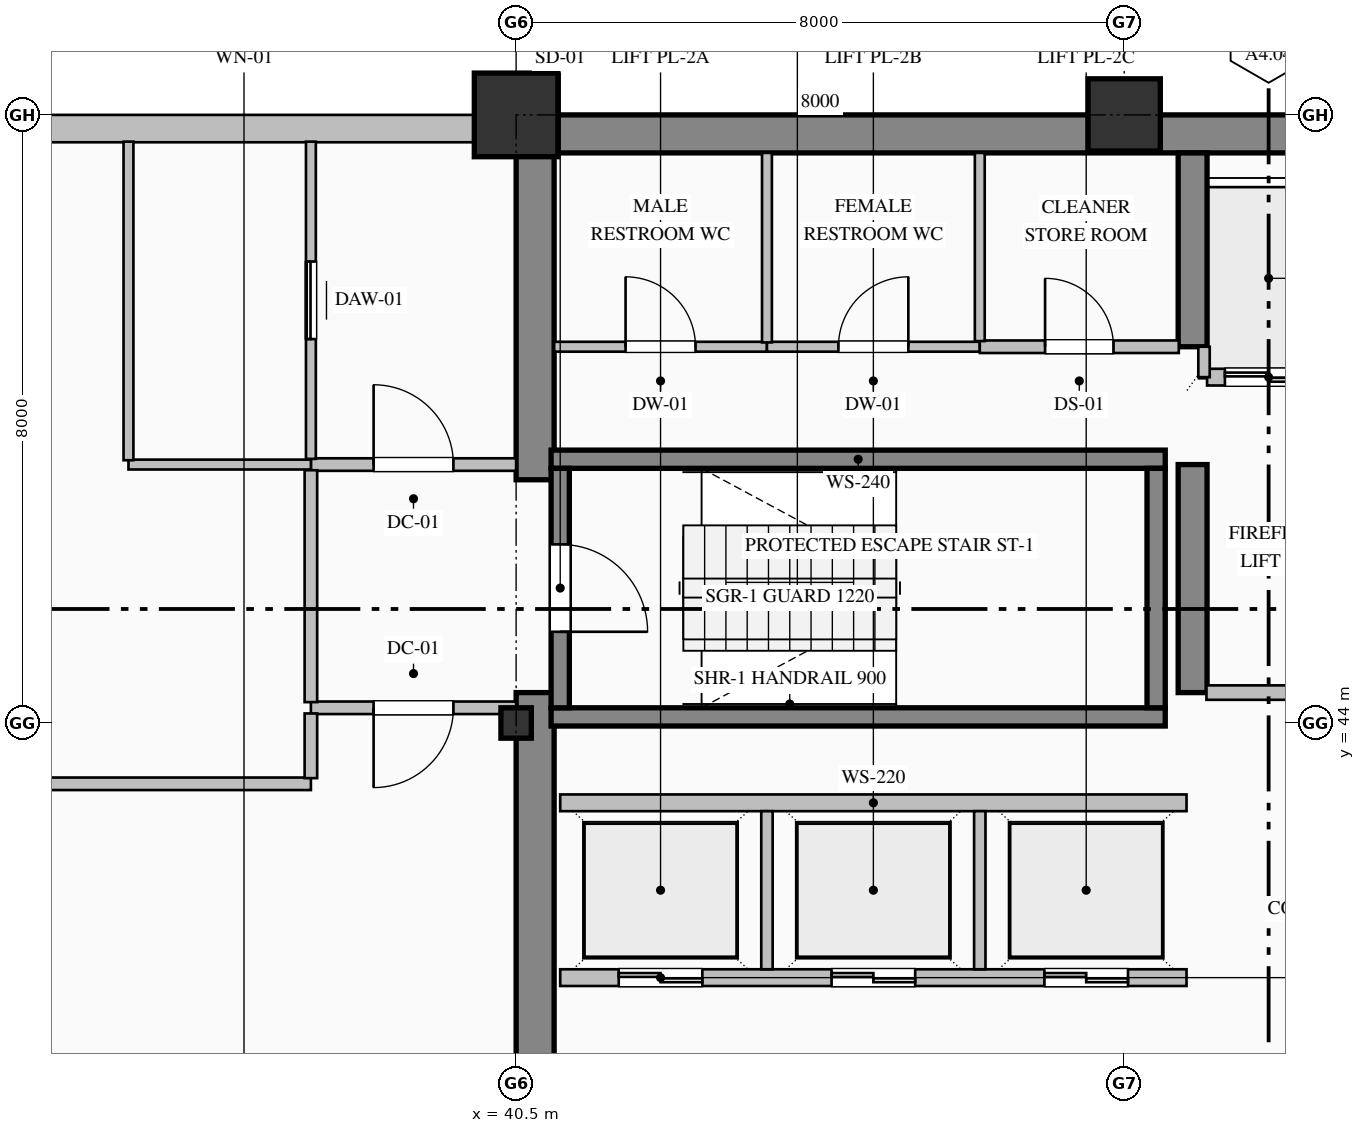
"""IFC4 building model, lengths in metres.
Left out: names, types, materials, properties, quantities, classifications, styles, units other than length and angle.
Written with IfcOpenShell. Run it as: python <this file> out.ifc"""

import sys

from ifc_helpers import new_model, si_unit, direction, frame, frame_2d, origin, origin_2d, place, context, subcontext, project, spatial, rectangle, hollow_rectangle, i_section, extrude, element, fill, save


model = new_model("IFC4")
c1 = context("Model", 3, precision=1e-05, world=origin(), true_north=direction((0.0, 1.0)))
c2 = subcontext(c1, "Body", "Model", "MODEL_VIEW")
j1 = project(units=[si_unit("LENGTHUNIT", "METRE"), si_unit("PLANEANGLEUNIT", "RADIAN")], contexts=[c1])
p1 = place(None, origin())
s1 = spatial("IfcSite", under=j1, at=p1, CompositionType="ELEMENT")
p2 = place(p1, origin())
s2 = spatial("IfcBuilding", under=s1, at=p2, CompositionType="ELEMENT")
p3 = place(p2, frame((0.0, 0.0, 155.0)))
s3 = spatial("IfcBuildingStorey", under=s2, at=p3, CompositionType="ELEMENT", Elevation=155.0)
p4 = place(p3, frame((40.5, 51.75, 0.0), z_axis=(0.0, 0.0, 1.0), x_axis=(1.0, 0.0, 0.0)))
e1 = element("IfcWall", 1, at=p4, inside=s3, PredefinedType="SHEAR", context=c2, shape_type="SweptSolid", body=[
    extrude(rectangle(XDim=23.5, YDim=0.5, at=frame_2d((11.75, 0.0))), origin(), (0.0, 0.0, 1.0), 3.765),
])
p5 = place(p3, frame((40.75, 36.5, 0.0), z_axis=(0.0, 0.0, 1.0), x_axis=(0.0, 1.0, 0.0)))
e2 = element("IfcWall", 2, at=p5, inside=s3, PredefinedType="SHEAR", context=c2, shape_type="SweptSolid", body=[
    extrude(rectangle(XDim=7.9, YDim=0.5, at=frame_2d((3.95, 0.0))), origin(), (0.0, 0.0, 1.0), 3.765),
])
p6 = place(p3, frame((40.75, 47.2, 0.0), z_axis=(0.0, 0.0, 1.0), x_axis=(0.0, 1.0, 0.0)))
e3 = element("IfcWall", 3, at=p6, inside=s3, PredefinedType="SHEAR", context=c2, shape_type="SweptSolid", body=[
    extrude(rectangle(XDim=4.3, YDim=0.5, at=frame_2d((2.15, 0.0))), origin(), (0.0, 0.0, 1.0), 3.765),
])
p7 = place(p3, frame((49.4, 44.4, 0.0), z_axis=(0.0, 0.0, 1.0), x_axis=(0.0, 1.0, 0.0)))
e4 = element("IfcWall", 4, at=p7, inside=s3, PredefinedType="SHEAR", context=c2, shape_type="SweptSolid", body=[
    extrude(rectangle(XDim=3.0, YDim=0.38, at=frame_2d((1.5, 0.0))), origin(), (0.0, 0.0, 1.0), 3.765),
])
p8 = place(p3, frame((49.4, 48.95, 0.0), z_axis=(0.0, 0.0, 1.0), x_axis=(0.0, 1.0, 0.0)))
e5 = element("IfcWall", 5, at=p8, inside=s3, PredefinedType="SHEAR", context=c2, shape_type="SweptSolid", body=[
    extrude(rectangle(XDim=2.55, YDim=0.38, at=frame_2d((1.275, 0.0))), origin(), (0.0, 0.0, 1.0), 3.765),
])
p9 = place(p3, frame((40.5, 44.0, 0.0), z_axis=(0.0, 0.0, 1.0), x_axis=(1.0, 0.0, 0.0)))
e6 = element("IfcColumn", 6, at=p9, inside=s3, PredefinedType="COLUMN", context=c2, shape_type="SweptSolid", body=[
    extrude(i_section(OverallWidth=0.4, OverallDepth=0.4, WebThickness=0.013, FlangeThickness=0.021, FilletRadius=0.022, at=origin_2d()), origin(), (0.0, 0.0, 1.0), 4.0),
])
p10 = place(p3, frame((40.5, 52.0, 0.0), z_axis=(0.0, 0.0, 1.0), x_axis=(1.0, 0.0, 0.0)))
e7 = element("IfcColumn", 7, at=p10, inside=s3, PredefinedType="COLUMN", context=c2, shape_type="SweptSolid", body=[
    extrude(hollow_rectangle(XDim=1.1, YDim=1.1, WallThickness=0.04, at=origin_2d()), origin(), (0.0, 0.0, 1.0), 4.0),
])
p11 = place(p3, frame((48.5, 52.0, 0.0), z_axis=(0.0, 0.0, 1.0), x_axis=(1.0, 0.0, 0.0)))
e8 = element("IfcColumn", 8, at=p11, inside=s3, PredefinedType="COLUMN", context=c2, shape_type="SweptSolid", body=[
    extrude(hollow_rectangle(XDim=0.95, YDim=0.95, WallThickness=0.036, at=origin_2d()), origin(), (0.0, 0.0, 1.0), 4.0),
])
p12 = place(p3, frame((13.0, 51.82, 0.0), z_axis=(0.0, 0.0, 1.0), x_axis=(1.0, 0.0, 0.0)))
e9 = element("IfcWall", 9, at=p12, inside=s3, PredefinedType="SOLIDWALL", context=c2, shape_type="SweptSolid", body=[
    extrude(rectangle(XDim=27.52, YDim=0.36, at=frame_2d((13.76, 0.0))), origin(), (0.0, 0.0, 1.0), 3.265),
])
p13 = place(p12, frame((6.375, 0.0, 0.85)))
e10 = element("IfcOpeningElement", 10, at=p13, cuts=e9, PredefinedType="OPENING", context=c2, shape_type="SweptSolid", body=[
    extrude(rectangle(XDim=1.65, YDim=1.95, at=frame_2d((0.825, 0.975))), frame((0.0, 0.19, 0.0), z_axis=(0.0, -1.0, 0.0), x_axis=(1.0, 0.0, 0.0)), (0.0, 0.0, 1.0), 0.38),
])
p14 = place(p12, frame((13.65, 0.0, 0.85)))
e11 = element("IfcOpeningElement", 11, at=p14, cuts=e9, PredefinedType="OPENING", context=c2, shape_type="SweptSolid", body=[
    extrude(rectangle(XDim=1.5, YDim=1.95, at=frame_2d((0.75, 0.975))), frame((0.0, 0.19, 0.0), z_axis=(0.0, -1.0, 0.0), x_axis=(1.0, 0.0, 0.0)), (0.0, 0.0, 1.0), 0.38),
])
for number, where, z_axis, x_axis in (
    (12, (40.96, 47.47, 0.0), (0.0, 0.0, 1.0), (1.0, 0.0, 0.0)),
    (13, (49.04, 44.08, 0.0), (0.0, 0.0, 1.0), (-1.0, 0.0, 0.0)),
):
    element("IfcWall", number, at=place(p3, frame(where, z_axis=z_axis, x_axis=x_axis)), inside=s3, PredefinedType="SOLIDWALL", context=c2, shape_type="SweptSolid", body=[
        extrude(rectangle(XDim=8.08, YDim=0.24, at=frame_2d((4.04, 0.0))), origin(), (0.0, 0.0, 1.0), 4.0),
    ])
p15 = place(p3, frame((41.08, 47.35, 0.0), z_axis=(0.0, 0.0, 1.0), x_axis=(0.0, -1.0, 0.0)))
e14 = element("IfcWall", 14, at=p15, inside=s3, PredefinedType="SOLIDWALL", context=c2, shape_type="SweptSolid", body=[
    extrude(rectangle(XDim=3.15, YDim=0.24, at=frame_2d((1.575, 0.0))), origin(), (0.0, 0.0, 1.0), 4.0),
])
p16 = place(p15, frame((1.0, 0.0, 0.0)))
e15 = element("IfcOpeningElement", 15, at=p16, cuts=e14, PredefinedType="OPENING", context=c2, shape_type="SweptSolid", body=[
    extrude(rectangle(XDim=1.15, YDim=2.2, at=frame_2d((0.575, 1.1))), frame((0.0, 0.13, 0.0), z_axis=(0.0, -1.0, 0.0), x_axis=(1.0, 0.0, 0.0)), (0.0, 0.0, 1.0), 0.26),
])
p17 = place(p3, frame((48.92, 44.2, 0.0), z_axis=(0.0, 0.0, 1.0), x_axis=(0.0, 1.0, 0.0)))
e16 = element("IfcWall", 16, at=p17, inside=s3, PredefinedType="SOLIDWALL", context=c2, shape_type="SweptSolid", body=[
    extrude(rectangle(XDim=3.15, YDim=0.24, at=frame_2d((1.575, 0.0))), origin(), (0.0, 0.0, 1.0), 4.0),
])
p18 = place(p3, frame((54.71, 48.55, 0.0), z_axis=(0.0, 0.0, 1.0), x_axis=(-1.0, 0.0, 0.0)))
e17 = element("IfcWall", 17, at=p18, inside=s3, PredefinedType="PARTITIONING", context=c2, shape_type="SweptSolid", body=[
    extrude(rectangle(XDim=5.12, YDim=0.22, at=frame_2d((2.56, 0.0))), origin(), (0.0, 0.0, 1.0), 3.765),
])
p19 = place(p18, frame((3.735, 0.0, 0.0)))
e18 = element("IfcOpeningElement", 18, at=p19, cuts=e17, PredefinedType="OPENING", context=c2, shape_type="SweptSolid", body=[
    extrude(rectangle(XDim=1.15, YDim=2.2, at=frame_2d((0.575, 1.1))), frame((0.0, 0.12, 0.0), z_axis=(0.0, -1.0, 0.0), x_axis=(1.0, 0.0, 0.0)), (0.0, 0.0, 1.0), 0.24),
])
p20 = place(p18, frame((0.935, 0.0, 0.0)))
e19 = element("IfcOpeningElement", 19, at=p20, cuts=e17, PredefinedType="OPENING", context=c2, shape_type="SweptSolid", body=[
    extrude(rectangle(XDim=1.15, YDim=2.2, at=frame_2d((0.575, 1.1))), frame((0.0, 0.12, 0.0), z_axis=(0.0, -1.0, 0.0), x_axis=(1.0, 0.0, 0.0)), (0.0, 0.0, 1.0), 0.24),
])
p21 = place(p3, frame((49.55, 48.55, 0.0), z_axis=(0.0, 0.0, 1.0), x_axis=(0.0, 1.0, 0.0)))
e20 = element("IfcWall", 20, at=p21, inside=s3, PredefinedType="PARTITIONING", context=c2, shape_type="SweptSolid", body=[
    extrude(rectangle(XDim=0.4, YDim=0.15, at=frame_2d((0.2, 0.0))), origin(), (0.0, 0.0, 1.0), 3.765),
])
p22 = place(p3, frame((49.32, 40.65, 0.0), z_axis=(0.0, 0.0, 1.0), x_axis=(-1.0, 0.0, 0.0)))
e21 = element("IfcWall", 21, at=p22, inside=s3, PredefinedType="PARTITIONING", context=c2, shape_type="SweptSolid", body=[
    extrude(rectangle(XDim=8.24, YDim=0.22, at=frame_2d((4.12, 0.0))), origin(), (0.0, 0.0, 1.0), 3.765),
])
p23 = place(p22, frame((6.37, 0.0, 0.0)))
e22 = element("IfcOpeningElement", 22, at=p23, cuts=e21, PredefinedType="OPENING", context=c2, shape_type="SweptSolid", body=[
    extrude(rectangle(XDim=1.1, YDim=2.2, at=frame_2d((0.55, 1.1))), frame((0.0, 0.12, 0.0), z_axis=(0.0, -1.0, 0.0), x_axis=(1.0, 0.0, 0.0)), (0.0, 0.0, 1.0), 0.24),
])
p24 = place(p22, frame((3.57, 0.0, 0.0)))
e23 = element("IfcOpeningElement", 23, at=p24, cuts=e21, PredefinedType="OPENING", context=c2, shape_type="SweptSolid", body=[
    extrude(rectangle(XDim=1.1, YDim=2.2, at=frame_2d((0.55, 1.1))), frame((0.0, 0.12, 0.0), z_axis=(0.0, -1.0, 0.0), x_axis=(1.0, 0.0, 0.0)), (0.0, 0.0, 1.0), 0.24),
])
p25 = place(p22, frame((0.77, 0.0, 0.0)))
e24 = element("IfcOpeningElement", 24, at=p25, cuts=e21, PredefinedType="OPENING", context=c2, shape_type="SweptSolid", body=[
    extrude(rectangle(XDim=1.1, YDim=2.2, at=frame_2d((0.55, 1.1))), frame((0.0, 0.12, 0.0), z_axis=(0.0, -1.0, 0.0), x_axis=(1.0, 0.0, 0.0)), (0.0, 0.0, 1.0), 0.24),
])
p26 = place(p3, frame((41.08, 42.95, 0.0), z_axis=(0.0, 0.0, 1.0), x_axis=(1.0, 0.0, 0.0)))
e25 = element("IfcWall", 25, at=p26, inside=s3, PredefinedType="PARTITIONING", context=c2, shape_type="SweptSolid", body=[
    extrude(rectangle(XDim=8.24, YDim=0.22, at=frame_2d((4.12, 0.0))), origin(), (0.0, 0.0, 1.0), 3.765),
])
for number, where, z_axis, x_axis in (
    (26, (43.8, 40.76, 0.0), (0.0, 0.0, 1.0), (0.0, 1.0, 0.0)),
    (27, (46.6, 40.76, 0.0), (0.0, 0.0, 1.0), (0.0, 1.0, 0.0)),
):
    element("IfcWall", number, at=place(p3, frame(where, z_axis=z_axis, x_axis=x_axis)), inside=s3, PredefinedType="PARTITIONING", context=c2, shape_type="SweptSolid", body=[
        extrude(rectangle(XDim=2.08, YDim=0.15, at=frame_2d((1.04, 0.0))), origin(), (0.0, 0.0, 1.0), 3.765),
    ])
p27 = place(p3, frame((37.8, 47.4, 0.0), z_axis=(0.0, 0.0, 1.0), x_axis=(1.0, 0.0, 0.0)))
e28 = element("IfcWall", 28, at=p27, inside=s3, PredefinedType="PARTITIONING", context=c2, shape_type="SweptSolid", body=[
    extrude(rectangle(XDim=2.7, YDim=0.165, at=frame_2d((1.35, 0.0))), origin(), (0.0, 0.0, 1.0), 3.765),
])
p28 = place(p27, frame((0.825, 0.0, 0.0)))
e29 = element("IfcOpeningElement", 29, at=p28, cuts=e28, PredefinedType="OPENING", context=c2, shape_type="SweptSolid", body=[
    extrude(rectangle(XDim=1.05, YDim=2.15, at=frame_2d((0.525, 1.075))), frame((0.0, 0.093, 0.0), z_axis=(0.0, -1.0, 0.0), x_axis=(1.0, 0.0, 0.0)), (0.0, 0.0, 1.0), 0.185),
])
p29 = place(p3, frame((40.5, 44.2, 0.0), z_axis=(0.0, 0.0, 1.0), x_axis=(-1.0, 0.0, 0.0)))
e30 = element("IfcWall", 30, at=p29, inside=s3, PredefinedType="PARTITIONING", context=c2, shape_type="SweptSolid", body=[
    extrude(rectangle(XDim=2.7, YDim=0.165, at=frame_2d((1.35, 0.0))), origin(), (0.0, 0.0, 1.0), 3.765),
])
p30 = place(p29, frame((0.825, 0.0, 0.0)))
e31 = element("IfcOpeningElement", 31, at=p30, cuts=e30, PredefinedType="OPENING", context=c2, shape_type="SweptSolid", body=[
    extrude(rectangle(XDim=1.05, YDim=2.15, at=frame_2d((0.525, 1.075))), frame((0.0, 0.093, 0.0), z_axis=(0.0, -1.0, 0.0), x_axis=(1.0, 0.0, 0.0)), (0.0, 0.0, 1.0), 0.185),
])
p31 = place(p3, frame((37.8, 44.274, 0.0), z_axis=(0.0, 0.0, 1.0), x_axis=(0.0, 1.0, 0.0)))
e32 = element("IfcWall", 32, at=p31, inside=s3, PredefinedType="PARTITIONING", context=c2, shape_type="SweptSolid", body=[
    extrude(rectangle(XDim=3.051, YDim=0.165, at=frame_2d((1.525, 0.0))), origin(), (0.0, 0.0, 1.0), 3.765),
])
p32 = place(p3, frame((37.8, 47.475, 0.0), z_axis=(0.0, 0.0, 1.0), x_axis=(0.0, 1.0, 0.0)))
e33 = element("IfcWall", 33, at=p32, inside=s3, PredefinedType="PARTITIONING", context=c2, shape_type="SweptSolid", body=[
    extrude(rectangle(XDim=4.173, YDim=0.13, at=frame_2d((2.087, 0.0))), origin(), (0.0, 0.0, 1.0), 3.765),
])
p33 = place(p32, frame((1.577, 0.0, 0.0)))
e34 = element("IfcOpeningElement", 34, at=p33, cuts=e33, PredefinedType="OPENING", context=c2, shape_type="SweptSolid", body=[
    extrude(rectangle(XDim=1.02, YDim=2.15, at=frame_2d((0.51, 1.075))), frame((0.0, 0.075, 0.0), z_axis=(0.0, -1.0, 0.0), x_axis=(1.0, 0.0, 0.0)), (0.0, 0.0, 1.0), 0.15),
])
p34 = place(p3, frame((37.8, 47.4, 0.0), z_axis=(0.0, 0.0, 1.0), x_axis=(-1.0, 0.0, 0.0)))
e35 = element("IfcWall", 35, at=p34, inside=s3, PredefinedType="PARTITIONING", context=c2, shape_type="SweptSolid", body=[
    extrude(rectangle(XDim=2.4, YDim=0.13, at=frame_2d((1.2, 0.0))), origin(), (0.0, 0.0, 1.0), 3.765),
])
p35 = place(p3, frame((35.4, 47.457, 0.0), z_axis=(0.0, 0.0, 1.0), x_axis=(0.0, 1.0, 0.0)))
e36 = element("IfcWall", 36, at=p35, inside=s3, PredefinedType="PARTITIONING", context=c2, shape_type="SweptSolid", body=[
    extrude(rectangle(XDim=4.191, YDim=0.13, at=frame_2d((2.095, 0.0))), origin(), (0.0, 0.0, 1.0), 3.765),
])
p36 = place(p3, frame((41.0, 48.95, 0.0), z_axis=(0.0, 0.0, 1.0), x_axis=(1.0, 0.0, 0.0)))
e37 = element("IfcWall", 37, at=p36, inside=s3, PredefinedType="PARTITIONING", context=c2, shape_type="SweptSolid", body=[
    extrude(rectangle(XDim=2.8, YDim=0.13, at=frame_2d((1.4, 0.0))), origin(), (0.0, 0.0, 1.0), 3.765),
])
p37 = place(p36, frame((0.94, 0.0, 0.0)))
e38 = element("IfcOpeningElement", 38, at=p37, cuts=e37, PredefinedType="OPENING", context=c2, shape_type="SweptSolid", body=[
    extrude(rectangle(XDim=0.92, YDim=2.15, at=frame_2d((0.46, 1.075))), frame((0.0, 0.075, 0.0), z_axis=(0.0, -1.0, 0.0), x_axis=(1.0, 0.0, 0.0)), (0.0, 0.0, 1.0), 0.15),
])
p38 = place(p3, frame((43.8, 48.95, 0.0), z_axis=(0.0, 0.0, 1.0), x_axis=(1.0, 0.0, 0.0)))
e39 = element("IfcWall", 39, at=p38, inside=s3, PredefinedType="PARTITIONING", context=c2, shape_type="SweptSolid", body=[
    extrude(rectangle(XDim=2.8, YDim=0.13, at=frame_2d((1.4, 0.0))), origin(), (0.0, 0.0, 1.0), 3.765),
])
p39 = place(p38, frame((0.94, 0.0, 0.0)))
e40 = element("IfcOpeningElement", 40, at=p39, cuts=e39, PredefinedType="OPENING", context=c2, shape_type="SweptSolid", body=[
    extrude(rectangle(XDim=0.92, YDim=2.15, at=frame_2d((0.46, 1.075))), frame((0.0, 0.075, 0.0), z_axis=(0.0, -1.0, 0.0), x_axis=(1.0, 0.0, 0.0)), (0.0, 0.0, 1.0), 0.15),
])
p40 = place(p3, frame((46.6, 48.95, 0.0), z_axis=(0.0, 0.0, 1.0), x_axis=(1.0, 0.0, 0.0)))
e41 = element("IfcWall", 41, at=p40, inside=s3, PredefinedType="PARTITIONING", context=c2, shape_type="SweptSolid", body=[
    extrude(rectangle(XDim=2.618, YDim=0.165, at=frame_2d((1.309, 0.0))), origin(), (0.0, 0.0, 1.0), 3.765),
])
p41 = place(p40, frame((0.859, 0.0, 0.0)))
e42 = element("IfcOpeningElement", 42, at=p41, cuts=e41, PredefinedType="OPENING", context=c2, shape_type="SweptSolid", body=[
    extrude(rectangle(XDim=0.9, YDim=2.15, at=frame_2d((0.45, 1.075))), frame((0.0, 0.093, 0.0), z_axis=(0.0, -1.0, 0.0), x_axis=(1.0, 0.0, 0.0)), (0.0, 0.0, 1.0), 0.185),
])
p42 = place(p3, frame((54.718, 44.4, 0.0), z_axis=(0.0, 0.0, 1.0), x_axis=(-1.0, 0.0, 0.0)))
e43 = element("IfcWall", 43, at=p42, inside=s3, PredefinedType="PARTITIONING", context=c2, shape_type="SweptSolid", body=[
    extrude(rectangle(XDim=5.136, YDim=0.19, at=frame_2d((2.568, 0.0))), origin(), (0.0, 0.0, 1.0), 3.765),
])
p43 = place(p42, frame((2.043, 0.0, 0.0)))
e44 = element("IfcOpeningElement", 44, at=p43, cuts=e43, PredefinedType="OPENING", context=c2, shape_type="SweptSolid", body=[
    extrude(rectangle(XDim=1.05, YDim=2.15, at=frame_2d((0.525, 1.075))), frame((0.0, 0.105, 0.0), z_axis=(0.0, -1.0, 0.0), x_axis=(1.0, 0.0, 0.0)), (0.0, 0.0, 1.0), 0.21),
])
p44 = place(p3, frame((43.8, 51.5, 0.0), z_axis=(0.0, 0.0, 1.0), x_axis=(0.0, -1.0, 0.0)))
e45 = element("IfcWall", 45, at=p44, inside=s3, PredefinedType="PARTITIONING", context=c2, shape_type="SweptSolid", body=[
    extrude(rectangle(XDim=2.493, YDim=0.13, at=frame_2d((1.247, 0.0))), origin(), (0.0, 0.0, 1.0), 3.765),
])
p45 = place(p3, frame((46.6, 51.5, 0.0), z_axis=(0.0, 0.0, 1.0), x_axis=(0.0, -1.0, 0.0)))
e46 = element("IfcWall", 46, at=p45, inside=s3, PredefinedType="PARTITIONING", context=c2, shape_type="SweptSolid", body=[
    extrude(rectangle(XDim=2.476, YDim=0.13, at=frame_2d((1.238, 0.0))), origin(), (0.0, 0.0, 1.0), 3.765),
])
p46 = place(p3, frame((24.5, 43.2, 0.0), z_axis=(0.0, 0.0, 1.0), x_axis=(1.0, 0.0, 0.0)))
e47 = element("IfcWall", 47, at=p46, inside=s3, PredefinedType="PARTITIONING", context=c2, shape_type="SweptSolid", body=[
    extrude(rectangle(XDim=13.3, YDim=0.165, at=frame_2d((6.65, 0.0))), origin(), (0.0, 0.0, 1.0), 3.765),
])
p47 = place(p46, frame((6.15, 0.0, 0.0)))
e48 = element("IfcOpeningElement", 48, at=p47, cuts=e47, PredefinedType="OPENING", context=c2, shape_type="SweptSolid", body=[
    extrude(rectangle(XDim=1.0, YDim=2.15, at=frame_2d((0.5, 1.075))), frame((0.0, 0.093, 0.0), z_axis=(0.0, -1.0, 0.0), x_axis=(1.0, 0.0, 0.0)), (0.0, 0.0, 1.0), 0.185),
])
p48 = place(p3, frame((37.8, 43.274, 0.0), z_axis=(0.0, 0.0, 1.0), x_axis=(0.0, 1.0, 0.0)))
e49 = element("IfcWall", 49, at=p48, inside=s3, PredefinedType="PARTITIONING", context=c2, shape_type="SweptSolid", body=[
    extrude(rectangle(XDim=0.851, YDim=0.165, at=frame_2d((0.426, 0.0))), origin(), (0.0, 0.0, 1.0), 3.765),
])
p49 = place(p16, origin())
e50 = element("IfcDoor", 50, at=p49, inside=s3, OperationType="SINGLE_SWING_RIGHT", PredefinedType="DOOR", context=c2, shape_type="SweptSolid", body=[
    extrude(rectangle(XDim=1.15, YDim=2.2, at=frame_2d((0.575, 1.1))), frame((0.0, 0.025, 0.0), z_axis=(0.0, -1.0, 0.0), x_axis=(1.0, 0.0, 0.0)), (0.0, 0.0, 1.0), 0.05),
])
fill(e15, e50)
p50 = place(p19, origin())
e51 = element("IfcDoor", 51, at=p50, inside=s3, OperationType="DOUBLE_DOOR_SLIDING", PredefinedType="DOOR", context=c2, shape_type="SweptSolid", body=[
    extrude(rectangle(XDim=1.15, YDim=2.2, at=frame_2d((0.575, 1.1))), frame((0.0, 0.025, 0.0), z_axis=(0.0, -1.0, 0.0), x_axis=(1.0, 0.0, 0.0)), (0.0, 0.0, 1.0), 0.05),
])
fill(e18, e51)
p51 = place(p23, origin())
e52 = element("IfcDoor", 52, at=p51, inside=s3, OperationType="DOUBLE_DOOR_SLIDING", PredefinedType="DOOR", context=c2, shape_type="SweptSolid", body=[
    extrude(rectangle(XDim=1.1, YDim=2.2, at=frame_2d((0.55, 1.1))), frame((0.0, 0.025, 0.0), z_axis=(0.0, -1.0, 0.0), x_axis=(1.0, 0.0, 0.0)), (0.0, 0.0, 1.0), 0.05),
])
fill(e22, e52)
p52 = place(p24, origin())
e53 = element("IfcDoor", 53, at=p52, inside=s3, OperationType="DOUBLE_DOOR_SLIDING", PredefinedType="DOOR", context=c2, shape_type="SweptSolid", body=[
    extrude(rectangle(XDim=1.1, YDim=2.2, at=frame_2d((0.55, 1.1))), frame((0.0, 0.025, 0.0), z_axis=(0.0, -1.0, 0.0), x_axis=(1.0, 0.0, 0.0)), (0.0, 0.0, 1.0), 0.05),
])
fill(e23, e53)
p53 = place(p25, origin())
e54 = element("IfcDoor", 54, at=p53, inside=s3, OperationType="DOUBLE_DOOR_SLIDING", PredefinedType="DOOR", context=c2, shape_type="SweptSolid", body=[
    extrude(rectangle(XDim=1.1, YDim=2.2, at=frame_2d((0.55, 1.1))), frame((0.0, 0.025, 0.0), z_axis=(0.0, -1.0, 0.0), x_axis=(1.0, 0.0, 0.0)), (0.0, 0.0, 1.0), 0.05),
])
fill(e24, e54)
p54 = place(p28, origin())
e55 = element("IfcDoor", 55, at=p54, inside=s3, OperationType="SINGLE_SWING_LEFT", PredefinedType="DOOR", context=c2, shape_type="SweptSolid", body=[
    extrude(rectangle(XDim=1.05, YDim=2.15, at=frame_2d((0.525, 1.075))), frame((0.0, 0.025, 0.0), z_axis=(0.0, -1.0, 0.0), x_axis=(1.0, 0.0, 0.0)), (0.0, 0.0, 1.0), 0.05),
])
fill(e29, e55)
p55 = place(p30, origin())
e56 = element("IfcDoor", 56, at=p55, inside=s3, OperationType="SINGLE_SWING_RIGHT", PredefinedType="DOOR", context=c2, shape_type="SweptSolid", body=[
    extrude(rectangle(XDim=1.05, YDim=2.15, at=frame_2d((0.525, 1.075))), frame((0.0, 0.025, 0.0), z_axis=(0.0, -1.0, 0.0), x_axis=(1.0, 0.0, 0.0)), (0.0, 0.0, 1.0), 0.05),
])
fill(e31, e56)
p56 = place(p33, origin())
e57 = element("IfcDoor", 57, at=p56, inside=s3, OperationType="SLIDING_TO_LEFT", PredefinedType="DOOR", context=c2, shape_type="SweptSolid", body=[
    extrude(rectangle(XDim=1.02, YDim=2.15, at=frame_2d((0.51, 1.075))), frame((0.0, 0.025, 0.0), z_axis=(0.0, -1.0, 0.0), x_axis=(1.0, 0.0, 0.0)), (0.0, 0.0, 1.0), 0.05),
])
fill(e34, e57)
p57 = place(p37, origin())
e58 = element("IfcDoor", 58, at=p57, inside=s3, OperationType="SINGLE_SWING_LEFT", PredefinedType="DOOR", context=c2, shape_type="SweptSolid", body=[
    extrude(rectangle(XDim=0.92, YDim=2.15, at=frame_2d((0.46, 1.075))), frame((0.0, 0.025, 0.0), z_axis=(0.0, -1.0, 0.0), x_axis=(1.0, 0.0, 0.0)), (0.0, 0.0, 1.0), 0.05),
])
fill(e38, e58)
p58 = place(p39, origin())
e59 = element("IfcDoor", 59, at=p58, inside=s3, OperationType="SINGLE_SWING_RIGHT", PredefinedType="DOOR", context=c2, shape_type="SweptSolid", body=[
    extrude(rectangle(XDim=0.92, YDim=2.15, at=frame_2d((0.46, 1.075))), frame((0.0, 0.025, 0.0), z_axis=(0.0, -1.0, 0.0), x_axis=(1.0, 0.0, 0.0)), (0.0, 0.0, 1.0), 0.05),
])
fill(e40, e59)
p59 = place(p41, origin())
e60 = element("IfcDoor", 60, at=p59, inside=s3, OperationType="SINGLE_SWING_LEFT", PredefinedType="DOOR", context=c2, shape_type="SweptSolid", body=[
    extrude(rectangle(XDim=0.9, YDim=2.15, at=frame_2d((0.45, 1.075))), frame((0.0, 0.025, 0.0), z_axis=(0.0, -1.0, 0.0), x_axis=(1.0, 0.0, 0.0)), (0.0, 0.0, 1.0), 0.05),
])
fill(e42, e60)
save(model, sys.argv[1])
